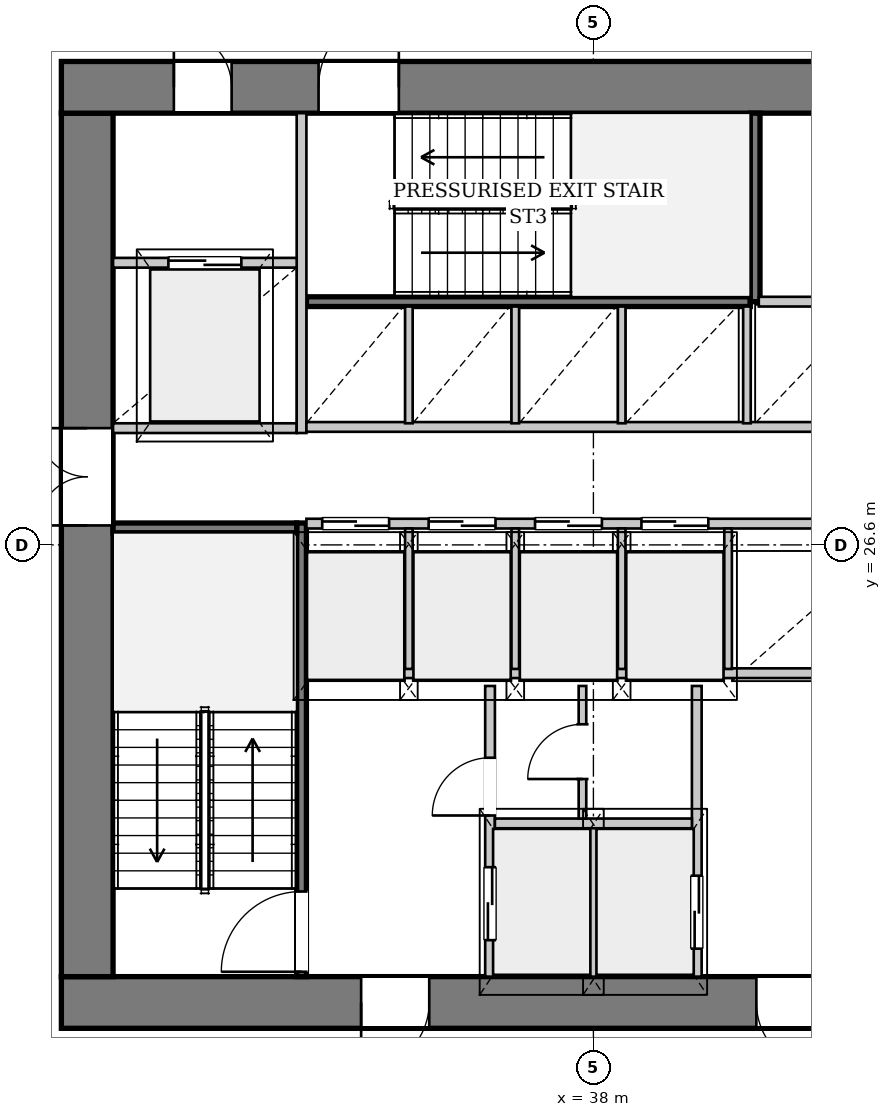
"""IFC4 building model, lengths in metres.
Left out: names, types, materials, properties, quantities, classifications, styles, units other than length and angle.
Written with IfcOpenShell. Run it as: python <this file> out.ifc"""

import sys

from ifc_helpers import new_model, si_unit, direction, frame, frame_2d, origin, place, context, subcontext, project, spatial, rectangle, extrude, source, transform, mapped, element, fill, save


model = new_model("IFC4")
c1 = context("Model", 3, precision=1e-05, world=origin(), true_north=direction((0.0, 1.0)))
c2 = subcontext(c1, "Body", "Model", "MODEL_VIEW")
j1 = project(units=[si_unit("LENGTHUNIT", "METRE"), si_unit("PLANEANGLEUNIT", "RADIAN")], contexts=[c1])
p1 = place(None, origin())
s1 = spatial("IfcSite", under=j1, at=p1, CompositionType="ELEMENT")
p2 = place(p1, origin())
s2 = spatial("IfcBuilding", under=s1, at=p2, CompositionType="ELEMENT")
p3 = place(p2, frame((0.0, 0.0, 54.15)))
s3 = spatial("IfcBuildingStorey", under=s2, at=p3, CompositionType="ELEMENT", Elevation=54.15)
p4 = place(p3, frame((46.75, 19.075, 0.0), z_axis=(0.0, 0.0, 1.0), x_axis=(-1.0, 0.0, 0.0)))
e1 = element("IfcWall", 1, at=p4, inside=s3, PredefinedType="SHEAR", context=c2, shape_type="SweptSolid", body=[
    extrude(rectangle(XDim=17.5, YDim=0.85, at=frame_2d((8.75, 0.0))), origin(), (0.0, 0.0, 1.0), 3.3),
])
p5 = place(p4, frame((4.95, 0.0, 0.0)))
e2 = element("IfcOpeningElement", 2, at=p5, cuts=e1, PredefinedType="OPENING", context=c2, shape_type="SweptSolid", body=[
    extrude(rectangle(XDim=1.12, YDim=2.25, at=frame_2d((0.56, 1.125))), frame((0.0, 0.435, 0.0), z_axis=(0.0, -1.0, 0.0), x_axis=(1.0, 0.0, 0.0)), (0.0, 0.0, 1.0), 0.87),
])
p6 = place(p4, frame((11.45, 0.0, 0.0)))
e3 = element("IfcOpeningElement", 3, at=p6, cuts=e1, PredefinedType="OPENING", context=c2, shape_type="SweptSolid", body=[
    extrude(rectangle(XDim=1.12, YDim=2.25, at=frame_2d((0.56, 1.125))), frame((0.0, 0.435, 0.0), z_axis=(0.0, -1.0, 0.0), x_axis=(1.0, 0.0, 0.0)), (0.0, 0.0, 1.0), 0.87),
])
p7 = place(p3, frame((29.675, 19.5, 0.0), z_axis=(0.0, 0.0, 1.0), x_axis=(0.0, 1.0, 0.0)))
e4 = element("IfcWall", 4, at=p7, inside=s3, PredefinedType="SHEAR", context=c2, shape_type="SweptSolid", body=[
    extrude(rectangle(XDim=14.2, YDim=0.85, at=frame_2d((7.1, 0.0))), origin(), (0.0, 0.0, 1.0), 3.3),
])
p8 = place(p7, frame((7.42, 0.0, 0.0)))
e5 = element("IfcOpeningElement", 5, at=p8, cuts=e4, PredefinedType="OPENING", context=c2, shape_type="SweptSolid", body=[
    extrude(rectangle(XDim=1.6, YDim=2.2, at=frame_2d((0.8, 1.1))), frame((0.0, 0.435, 0.0), z_axis=(0.0, -1.0, 0.0), x_axis=(1.0, 0.0, 0.0)), (0.0, 0.0, 1.0), 0.87),
])
p9 = place(p3, frame((29.25, 34.125, 0.0), z_axis=(0.0, 0.0, 1.0), x_axis=(1.0, 0.0, 0.0)))
e6 = element("IfcWall", 6, at=p9, inside=s3, PredefinedType="SHEAR", context=c2, shape_type="SweptSolid", body=[
    extrude(rectangle(XDim=17.5, YDim=0.85, at=frame_2d((8.75, 0.0))), origin(), (0.0, 0.0, 1.0), 3.3),
])
p10 = place(p9, frame((1.85, 0.0, 0.0)))
e7 = element("IfcOpeningElement", 7, at=p10, cuts=e6, PredefinedType="OPENING", context=c2, shape_type="SweptSolid", body=[
    extrude(rectangle(XDim=0.95, YDim=2.1, at=frame_2d((0.475, 1.05))), frame((0.0, 0.435, 0.0), z_axis=(0.0, -1.0, 0.0), x_axis=(1.0, 0.0, 0.0)), (0.0, 0.0, 1.0), 0.87),
])
p11 = place(p9, frame((4.23, 0.0, 0.0)))
e8 = element("IfcOpeningElement", 8, at=p11, cuts=e6, PredefinedType="OPENING", context=c2, shape_type="SweptSolid", body=[
    extrude(rectangle(XDim=1.32, YDim=2.2, at=frame_2d((0.66, 1.1))), frame((0.0, 0.435, 0.0), z_axis=(0.0, -1.0, 0.0), x_axis=(1.0, 0.0, 0.0)), (0.0, 0.0, 1.0), 0.87),
])
p12 = place(p9, frame((15.3, 0.0, 0.0)))
e9 = element("IfcOpeningElement", 9, at=p12, cuts=e6, PredefinedType="OPENING", context=c2, shape_type="SweptSolid", body=[
    extrude(rectangle(XDim=0.95, YDim=2.1, at=frame_2d((0.475, 1.05))), frame((0.0, 0.435, 0.0), z_axis=(0.0, -1.0, 0.0), x_axis=(1.0, 0.0, 0.0)), (0.0, 0.0, 1.0), 0.87),
])
p13 = place(p3, frame((33.2, 19.5, 0.0), z_axis=(0.0, 0.0, 1.0), x_axis=(0.0, 1.0, 0.0)))
e10 = element("IfcWall", 10, at=p13, inside=s3, PredefinedType="PARTITIONING", context=c2, shape_type="SweptSolid", body=[
    extrude(rectangle(XDim=7.46, YDim=0.16, at=frame_2d((3.73, 0.0))), origin(), (0.0, 0.0, 1.0), 3.3),
])
p14 = place(p13, frame((0.08, 0.0, 0.0)))
e11 = element("IfcOpeningElement", 11, at=p14, cuts=e10, PredefinedType="OPENING", context=c2, shape_type="SweptSolid", body=[
    extrude(rectangle(XDim=1.32, YDim=2.2, at=frame_2d((0.66, 1.1))), frame((0.0, 0.09, 0.0), z_axis=(0.0, -1.0, 0.0), x_axis=(1.0, 0.0, 0.0)), (0.0, 0.0, 1.0), 0.18),
])
p15 = place(p3, frame((30.1, 26.88, 0.0), z_axis=(0.0, 0.0, 1.0), x_axis=(1.0, 0.0, 0.0)))
e12 = element("IfcWall", 12, at=p15, inside=s3, PredefinedType="PARTITIONING", context=c2, shape_type="SweptSolid", body=[
    extrude(rectangle(XDim=3.02, YDim=0.16, at=frame_2d((1.51, 0.0))), origin(), (0.0, 0.0, 1.0), 3.3),
])
p16 = place(p3, frame((33.28, 30.6, 0.0), z_axis=(0.0, 0.0, 1.0), x_axis=(1.0, 0.0, 0.0)))
e13 = element("IfcWall", 13, at=p16, inside=s3, PredefinedType="PARTITIONING", context=c2, shape_type="SweptSolid", body=[
    extrude(rectangle(XDim=7.3, YDim=0.16, at=frame_2d((3.65, 0.0))), origin(), (0.0, 0.0, 1.0), 3.3),
])
p17 = place(p3, frame((40.66, 30.6, 0.0), z_axis=(0.0, 0.0, 1.0), x_axis=(0.0, 1.0, 0.0)))
e14 = element("IfcWall", 14, at=p17, inside=s3, PredefinedType="PARTITIONING", context=c2, shape_type="SweptSolid", body=[
    extrude(rectangle(XDim=3.1, YDim=0.16, at=frame_2d((1.55, 0.0))), origin(), (0.0, 0.0, 1.0), 3.3),
])
p18 = place(p3, frame((36.3, 19.5, 0.0), z_axis=(0.0, 0.0, 1.0), x_axis=(0.0, 1.0, 0.0)))
e15 = element("IfcWall", 15, at=p18, inside=s3, PredefinedType="PARTITIONING", context=c2, shape_type="SweptSolid", body=[
    extrude(rectangle(XDim=4.78, YDim=0.16, at=frame_2d((2.39, 0.0))), origin(), (0.0, 0.0, 1.0), 3.3),
])
p19 = place(p18, frame((0.6, 0.0, 0.0)))
e16 = element("IfcOpeningElement", 16, at=p19, cuts=e15, PredefinedType="OPENING", context=c2, shape_type="SweptSolid", body=[
    extrude(rectangle(XDim=1.2, YDim=2.2, at=frame_2d((0.6, 1.1))), frame((0.0, 0.09, 0.0), z_axis=(0.0, -1.0, 0.0), x_axis=(1.0, 0.0, 0.0)), (0.0, 0.0, 1.0), 0.18),
])
p20 = place(p18, frame((2.65, 0.0, 0.0)))
e17 = element("IfcOpeningElement", 17, at=p20, cuts=e15, PredefinedType="OPENING", context=c2, shape_type="SweptSolid", body=[
    extrude(rectangle(XDim=0.95, YDim=2.1, at=frame_2d((0.475, 1.05))), frame((0.0, 0.09, 0.0), z_axis=(0.0, -1.0, 0.0), x_axis=(1.0, 0.0, 0.0)), (0.0, 0.0, 1.0), 0.18),
])
p21 = place(p3, frame((39.7, 24.28, 0.0), z_axis=(0.0, 0.0, 1.0), x_axis=(0.0, -1.0, 0.0)))
e18 = element("IfcWall", 18, at=p21, inside=s3, PredefinedType="PARTITIONING", context=c2, shape_type="SweptSolid", body=[
    extrude(rectangle(XDim=4.78, YDim=0.16, at=frame_2d((2.39, 0.0))), origin(), (0.0, 0.0, 1.0), 3.3),
])
p22 = place(p21, frame((3.12, 0.0, 0.0)))
e19 = element("IfcOpeningElement", 19, at=p22, cuts=e18, PredefinedType="OPENING", context=c2, shape_type="SweptSolid", body=[
    extrude(rectangle(XDim=1.2, YDim=2.2, at=frame_2d((0.6, 1.1))), frame((0.0, 0.09, 0.0), z_axis=(0.0, -1.0, 0.0), x_axis=(1.0, 0.0, 0.0)), (0.0, 0.0, 1.0), 0.18),
])
p23 = place(p3, frame((38.0, 19.5, 0.0), z_axis=(0.0, 0.0, 1.0), x_axis=(0.0, 1.0, 0.0)))
e20 = element("IfcWall", 20, at=p23, inside=s3, PredefinedType="PARTITIONING", context=c2, shape_type="SweptSolid", body=[
    extrude(rectangle(XDim=2.46, YDim=0.125, at=frame_2d((1.23, 0.0))), origin(), (0.0, 0.0, 1.0), 3.3),
])
p24 = place(p3, frame((36.38, 22.02, 0.0), z_axis=(0.0, 0.0, 1.0), x_axis=(1.0, 0.0, 0.0)))
e21 = element("IfcWall", 21, at=p24, inside=s3, PredefinedType="PARTITIONING", context=c2, shape_type="SweptSolid", body=[
    extrude(rectangle(XDim=3.24, YDim=0.16, at=frame_2d((1.62, 0.0))), origin(), (0.0, 0.0, 1.0), 3.3),
])
p25 = place(p3, frame((33.28, 24.49, 0.0), z_axis=(0.0, 0.0, 1.0), x_axis=(1.0, 0.0, 0.0)))
e22 = element("IfcWall", 22, at=p25, inside=s3, PredefinedType="PARTITIONING", context=c2, shape_type="SweptSolid", body=[
    extrude(rectangle(XDim=9.44, YDim=0.16, at=frame_2d((4.72, 0.0))), origin(), (0.0, 0.0, 1.0), 3.3),
])
p26 = place(p3, frame((37.82, 22.1, 0.0), z_axis=(0.0, 0.0, 1.0), x_axis=(0.0, 1.0, 0.0)))
e23 = element("IfcWall", 23, at=p26, inside=s3, PredefinedType="PARTITIONING", context=c2, shape_type="SweptSolid", body=[
    extrude(rectangle(XDim=2.18, YDim=0.125, at=frame_2d((1.09, 0.0))), origin(), (0.0, 0.0, 1.0), 3.3),
])
p27 = place(p26, frame((0.65, 0.0, 0.0)))
e24 = element("IfcOpeningElement", 24, at=p27, cuts=e23, PredefinedType="OPENING", context=c2, shape_type="SweptSolid", body=[
    extrude(rectangle(XDim=0.9, YDim=2.1, at=frame_2d((0.45, 1.05))), frame((0.0, 0.073, 0.0), z_axis=(0.0, -1.0, 0.0), x_axis=(1.0, 0.0, 0.0)), (0.0, 0.0, 1.0), 0.145),
])
p28 = place(p3, frame((30.1, 28.52, 0.0), z_axis=(0.0, 0.0, 1.0), x_axis=(1.0, 0.0, 0.0)))
e25 = element("IfcWall", 25, at=p28, inside=s3, PredefinedType="PARTITIONING", context=c2, shape_type="SweptSolid", body=[
    extrude(rectangle(XDim=3.02, YDim=0.16, at=frame_2d((1.51, 0.0))), origin(), (0.0, 0.0, 1.0), 3.3),
])
p29 = place(p3, frame((33.2, 28.44, 0.0), z_axis=(0.0, 0.0, 1.0), x_axis=(0.0, 1.0, 0.0)))
e26 = element("IfcWall", 26, at=p29, inside=s3, PredefinedType="PARTITIONING", context=c2, shape_type="SweptSolid", body=[
    extrude(rectangle(XDim=5.26, YDim=0.16, at=frame_2d((2.63, 0.0))), origin(), (0.0, 0.0, 1.0), 3.3),
])
p30 = place(p3, frame((30.1, 31.24, 0.0), z_axis=(0.0, 0.0, 1.0), x_axis=(1.0, 0.0, 0.0)))
e27 = element("IfcWall", 27, at=p30, inside=s3, PredefinedType="PARTITIONING", context=c2, shape_type="SweptSolid", body=[
    extrude(rectangle(XDim=3.02, YDim=0.16, at=frame_2d((1.51, 0.0))), origin(), (0.0, 0.0, 1.0), 3.3),
])
p31 = place(p30, frame((0.91, 0.0, 0.0)))
e28 = element("IfcOpeningElement", 28, at=p31, cuts=e27, PredefinedType="OPENING", context=c2, shape_type="SweptSolid", body=[
    extrude(rectangle(XDim=1.2, YDim=2.2, at=frame_2d((0.6, 1.1))), frame((0.0, 0.09, 0.0), z_axis=(0.0, -1.0, 0.0), x_axis=(1.0, 0.0, 0.0)), (0.0, 0.0, 1.0), 0.18),
])
p32 = place(p3, frame((33.28, 26.95, 0.0), z_axis=(0.0, 0.0, 1.0), x_axis=(1.0, 0.0, 0.0)))
e29 = element("IfcWall", 29, at=p32, inside=s3, PredefinedType="PARTITIONING", context=c2, shape_type="SweptSolid", body=[
    extrude(rectangle(XDim=9.44, YDim=0.16, at=frame_2d((4.72, 0.0))), origin(), (0.0, 0.0, 1.0), 3.3),
])
p33 = place(p32, frame((0.26, 0.0, 0.0)))
e30 = element("IfcOpeningElement", 30, at=p33, cuts=e29, PredefinedType="OPENING", context=c2, shape_type="SweptSolid", body=[
    extrude(rectangle(XDim=1.1, YDim=2.2, at=frame_2d((0.55, 1.1))), frame((0.0, 0.09, 0.0), z_axis=(0.0, -1.0, 0.0), x_axis=(1.0, 0.0, 0.0)), (0.0, 0.0, 1.0), 0.18),
])
p34 = place(p32, frame((2.01, 0.0, 0.0)))
e31 = element("IfcOpeningElement", 31, at=p34, cuts=e29, PredefinedType="OPENING", context=c2, shape_type="SweptSolid", body=[
    extrude(rectangle(XDim=1.1, YDim=2.2, at=frame_2d((0.55, 1.1))), frame((0.0, 0.09, 0.0), z_axis=(0.0, -1.0, 0.0), x_axis=(1.0, 0.0, 0.0)), (0.0, 0.0, 1.0), 0.18),
])
p35 = place(p32, frame((3.76, 0.0, 0.0)))
e32 = element("IfcOpeningElement", 32, at=p35, cuts=e29, PredefinedType="OPENING", context=c2, shape_type="SweptSolid", body=[
    extrude(rectangle(XDim=1.1, YDim=2.2, at=frame_2d((0.55, 1.1))), frame((0.0, 0.09, 0.0), z_axis=(0.0, -1.0, 0.0), x_axis=(1.0, 0.0, 0.0)), (0.0, 0.0, 1.0), 0.18),
])
p36 = place(p32, frame((5.51, 0.0, 0.0)))
e33 = element("IfcOpeningElement", 33, at=p36, cuts=e29, PredefinedType="OPENING", context=c2, shape_type="SweptSolid", body=[
    extrude(rectangle(XDim=1.1, YDim=2.2, at=frame_2d((0.55, 1.1))), frame((0.0, 0.09, 0.0), z_axis=(0.0, -1.0, 0.0), x_axis=(1.0, 0.0, 0.0)), (0.0, 0.0, 1.0), 0.18),
])
for number, where, z_axis, x_axis in (
    (34, (34.965, 24.56, 0.0), (0.0, 0.0, 1.0), (0.0, 1.0, 0.0)),
    (35, (36.715, 24.56, 0.0), (0.0, 0.0, 1.0), (0.0, 1.0, 0.0)),
    (36, (38.465, 24.56, 0.0), (0.0, 0.0, 1.0), (0.0, 1.0, 0.0)),
    (37, (40.215, 24.56, 0.0), (0.0, 0.0, 1.0), (0.0, 1.0, 0.0)),
):
    element("IfcWall", number, at=place(p3, frame(where, z_axis=z_axis, x_axis=x_axis)), inside=s3, PredefinedType="PARTITIONING", context=c2, shape_type="SweptSolid", body=[
        extrude(rectangle(XDim=2.31, YDim=0.125, at=frame_2d((1.155, 0.0))), origin(), (0.0, 0.0, 1.0), 3.3),
    ])
p37 = place(p3, frame((33.28, 28.54, 0.0), z_axis=(0.0, 0.0, 1.0), x_axis=(1.0, 0.0, 0.0)))
e38 = element("IfcWall", 38, at=p37, inside=s3, PredefinedType="PARTITIONING", context=c2, shape_type="SweptSolid", body=[
    extrude(rectangle(XDim=12.62, YDim=0.16, at=frame_2d((6.31, 0.0))), origin(), (0.0, 0.0, 1.0), 3.3),
])
p38 = place(p3, frame((40.72, 30.6, 0.0), z_axis=(0.0, 0.0, 1.0), x_axis=(1.0, 0.0, 0.0)))
e39 = element("IfcWall", 39, at=p38, inside=s3, PredefinedType="PARTITIONING", context=c2, shape_type="SweptSolid", body=[
    extrude(rectangle(XDim=5.18, YDim=0.16, at=frame_2d((2.59, 0.0))), origin(), (0.0, 0.0, 1.0), 3.3),
])
for number, where, z_axis, x_axis in (
    (40, (34.965, 28.6, 0.0), (0.0, 0.0, 1.0), (0.0, 1.0, 0.0)),
    (41, (36.715, 28.6, 0.0), (0.0, 0.0, 1.0), (0.0, 1.0, 0.0)),
    (42, (38.465, 28.6, 0.0), (0.0, 0.0, 1.0), (0.0, 1.0, 0.0)),
    (43, (40.525, 28.6, 0.0), (0.0, 0.0, 1.0), (0.0, 1.0, 0.0)),
):
    element("IfcWall", number, at=place(p3, frame(where, z_axis=z_axis, x_axis=x_axis)), inside=s3, PredefinedType="PARTITIONING", context=c2, shape_type="SweptSolid", body=[
        extrude(rectangle(XDim=1.92, YDim=0.125, at=frame_2d((0.96, 0.0))), origin(), (0.0, 0.0, 1.0), 3.3),
    ])
m1 = source(origin(), c2, "Body", "SweptSolid", [
    extrude(rectangle(XDim=1.12, YDim=2.25, at=frame_2d((0.56, 1.125))), frame((0.0, 0.025, 0.0), z_axis=(0.0, -1.0, 0.0), x_axis=(1.0, 0.0, 0.0)), (0.0, 0.0, 1.0), 0.05),
])
p39 = place(p5, origin())
e44 = element("IfcDoor", 44, at=p39, inside=s3, OperationType="SINGLE_SWING_LEFT", PredefinedType="DOOR", context=c2, shape_type="MappedRepresentation", body=[
    mapped(m1, transform((0.0, 0.0, 0.0), x_axis=(1.0, 0.0, 0.0), y_axis=(0.0, 1.0, 0.0), z_axis=(0.0, 0.0, 1.0), scale=1.0)),
])
fill(e2, e44)
p40 = place(p6, origin())
e45 = element("IfcDoor", 45, at=p40, inside=s3, OperationType="SINGLE_SWING_RIGHT", PredefinedType="DOOR", context=c2, shape_type="MappedRepresentation", body=[
    mapped(m1, transform((0.0, 0.0, 0.0), x_axis=(1.0, 0.0, 0.0), y_axis=(0.0, 1.0, 0.0), z_axis=(0.0, 0.0, 1.0), scale=1.0)),
])
fill(e3, e45)
m2 = source(origin(), c2, "Body", "SweptSolid", [
    extrude(rectangle(XDim=1.6, YDim=2.2, at=frame_2d((0.8, 1.1))), frame((0.0, 0.025, 0.0), z_axis=(0.0, -1.0, 0.0), x_axis=(1.0, 0.0, 0.0)), (0.0, 0.0, 1.0), 0.05),
])
p41 = place(p8, origin())
e46 = element("IfcDoor", 46, at=p41, inside=s3, OperationType="DOUBLE_DOOR_SINGLE_SWING", PredefinedType="DOOR", context=c2, shape_type="MappedRepresentation", body=[
    mapped(m2, transform((0.0, 0.0, 0.0), x_axis=(1.0, 0.0, 0.0), y_axis=(0.0, 1.0, 0.0), z_axis=(0.0, 0.0, 1.0), scale=1.0)),
])
fill(e5, e46)
m3 = source(origin(), c2, "Body", "SweptSolid", [
    extrude(rectangle(XDim=0.95, YDim=2.1, at=frame_2d((0.475, 1.05))), frame((0.0, 0.025, 0.0), z_axis=(0.0, -1.0, 0.0), x_axis=(1.0, 0.0, 0.0)), (0.0, 0.0, 1.0), 0.05),
])
p42 = place(p10, origin())
e47 = element("IfcDoor", 47, at=p42, inside=s3, OperationType="SINGLE_SWING_LEFT", PredefinedType="DOOR", context=c2, shape_type="MappedRepresentation", body=[
    mapped(m3, transform((0.0, 0.0, 0.0), x_axis=(1.0, 0.0, 0.0), y_axis=(0.0, 1.0, 0.0), z_axis=(0.0, 0.0, 1.0), scale=1.0)),
])
fill(e7, e47)
m4 = source(origin(), c2, "Body", "SweptSolid", [
    extrude(rectangle(XDim=1.32, YDim=2.2, at=frame_2d((0.66, 1.1))), frame((0.0, 0.025, 0.0), z_axis=(0.0, -1.0, 0.0), x_axis=(1.0, 0.0, 0.0)), (0.0, 0.0, 1.0), 0.05),
])
p43 = place(p11, origin())
e48 = element("IfcDoor", 48, at=p43, inside=s3, OperationType="SINGLE_SWING_RIGHT", PredefinedType="DOOR", context=c2, shape_type="MappedRepresentation", body=[
    mapped(m4, transform((0.0, 0.0, 0.0), x_axis=(1.0, 0.0, 0.0), y_axis=(0.0, 1.0, 0.0), z_axis=(0.0, 0.0, 1.0), scale=1.0)),
])
fill(e8, e48)
p44 = place(p14, origin())
e49 = element("IfcDoor", 49, at=p44, inside=s3, OperationType="SINGLE_SWING_LEFT", PredefinedType="DOOR", context=c2, shape_type="MappedRepresentation", body=[
    mapped(m4, transform((0.0, 0.0, 0.0), x_axis=(1.0, 0.0, 0.0), y_axis=(0.0, 1.0, 0.0), z_axis=(0.0, 0.0, 1.0), scale=1.0)),
])
fill(e11, e49)
m5 = source(origin(), c2, "Body", "SweptSolid", [
    extrude(rectangle(XDim=1.2, YDim=2.2, at=frame_2d((0.6, 1.1))), frame((0.0, 0.025, 0.0), z_axis=(0.0, -1.0, 0.0), x_axis=(1.0, 0.0, 0.0)), (0.0, 0.0, 1.0), 0.05),
])
p45 = place(p19, origin())
e50 = element("IfcDoor", 50, at=p45, inside=s3, OperationType="DOUBLE_DOOR_SLIDING", PredefinedType="DOOR", context=c2, shape_type="MappedRepresentation", body=[
    mapped(m5, transform((0.0, 0.0, 0.0), x_axis=(1.0, 0.0, 0.0), y_axis=(0.0, 1.0, 0.0), z_axis=(0.0, 0.0, 1.0), scale=1.0)),
])
fill(e16, e50)
p46 = place(p20, origin())
e51 = element("IfcDoor", 51, at=p46, inside=s3, OperationType="SINGLE_SWING_LEFT", PredefinedType="DOOR", context=c2, shape_type="MappedRepresentation", body=[
    mapped(m3, transform((0.0, 0.0, 0.0), x_axis=(1.0, 0.0, 0.0), y_axis=(0.0, 1.0, 0.0), z_axis=(0.0, 0.0, 1.0), scale=1.0)),
])
fill(e17, e51)
m6 = source(origin(), c2, "Body", "SweptSolid", [
    extrude(rectangle(XDim=0.9, YDim=2.1, at=frame_2d((0.45, 1.05))), frame((0.0, 0.025, 0.0), z_axis=(0.0, -1.0, 0.0), x_axis=(1.0, 0.0, 0.0)), (0.0, 0.0, 1.0), 0.05),
])
p47 = place(p27, origin())
e52 = element("IfcDoor", 52, at=p47, inside=s3, OperationType="SINGLE_SWING_LEFT", PredefinedType="DOOR", context=c2, shape_type="MappedRepresentation", body=[
    mapped(m6, transform((0.0, 0.0, 0.0), x_axis=(1.0, 0.0, 0.0), y_axis=(0.0, 1.0, 0.0), z_axis=(0.0, 0.0, 1.0), scale=1.0)),
])
fill(e24, e52)
p48 = place(p22, origin())
e53 = element("IfcDoor", 53, at=p48, inside=s3, OperationType="DOUBLE_DOOR_SLIDING", PredefinedType="DOOR", context=c2, shape_type="MappedRepresentation", body=[
    mapped(m5, transform((0.0, 0.0, 0.0), x_axis=(1.0, 0.0, 0.0), y_axis=(0.0, 1.0, 0.0), z_axis=(0.0, 0.0, 1.0), scale=1.0)),
])
fill(e19, e53)
p49 = place(p31, origin())
e54 = element("IfcDoor", 54, at=p49, inside=s3, OperationType="DOUBLE_DOOR_SLIDING", PredefinedType="DOOR", context=c2, shape_type="MappedRepresentation", body=[
    mapped(m5, transform((0.0, 0.0, 0.0), x_axis=(1.0, 0.0, 0.0), y_axis=(0.0, 1.0, 0.0), z_axis=(0.0, 0.0, 1.0), scale=1.0)),
])
fill(e28, e54)
m7 = source(origin(), c2, "Body", "SweptSolid", [
    extrude(rectangle(XDim=1.1, YDim=2.2, at=frame_2d((0.55, 1.1))), frame((0.0, 0.025, 0.0), z_axis=(0.0, -1.0, 0.0), x_axis=(1.0, 0.0, 0.0)), (0.0, 0.0, 1.0), 0.05),
])
p50 = place(p33, origin())
e55 = element("IfcDoor", 55, at=p50, inside=s3, OperationType="DOUBLE_DOOR_SLIDING", PredefinedType="DOOR", context=c2, shape_type="MappedRepresentation", body=[
    mapped(m7, transform((0.0, 0.0, 0.0), x_axis=(1.0, 0.0, 0.0), y_axis=(0.0, 1.0, 0.0), z_axis=(0.0, 0.0, 1.0), scale=1.0)),
])
fill(e30, e55)
p51 = place(p34, origin())
e56 = element("IfcDoor", 56, at=p51, inside=s3, OperationType="DOUBLE_DOOR_SLIDING", PredefinedType="DOOR", context=c2, shape_type="MappedRepresentation", body=[
    mapped(m7, transform((0.0, 0.0, 0.0), x_axis=(1.0, 0.0, 0.0), y_axis=(0.0, 1.0, 0.0), z_axis=(0.0, 0.0, 1.0), scale=1.0)),
])
fill(e31, e56)
p52 = place(p35, origin())
e57 = element("IfcDoor", 57, at=p52, inside=s3, OperationType="DOUBLE_DOOR_SLIDING", PredefinedType="DOOR", context=c2, shape_type="MappedRepresentation", body=[
    mapped(m7, transform((0.0, 0.0, 0.0), x_axis=(1.0, 0.0, 0.0), y_axis=(0.0, 1.0, 0.0), z_axis=(0.0, 0.0, 1.0), scale=1.0)),
])
fill(e32, e57)
p53 = place(p36, origin())
e58 = element("IfcDoor", 58, at=p53, inside=s3, OperationType="DOUBLE_DOOR_SLIDING", PredefinedType="DOOR", context=c2, shape_type="MappedRepresentation", body=[
    mapped(m7, transform((0.0, 0.0, 0.0), x_axis=(1.0, 0.0, 0.0), y_axis=(0.0, 1.0, 0.0), z_axis=(0.0, 0.0, 1.0), scale=1.0)),
])
fill(e33, e58)
save(model, sys.argv[1])
